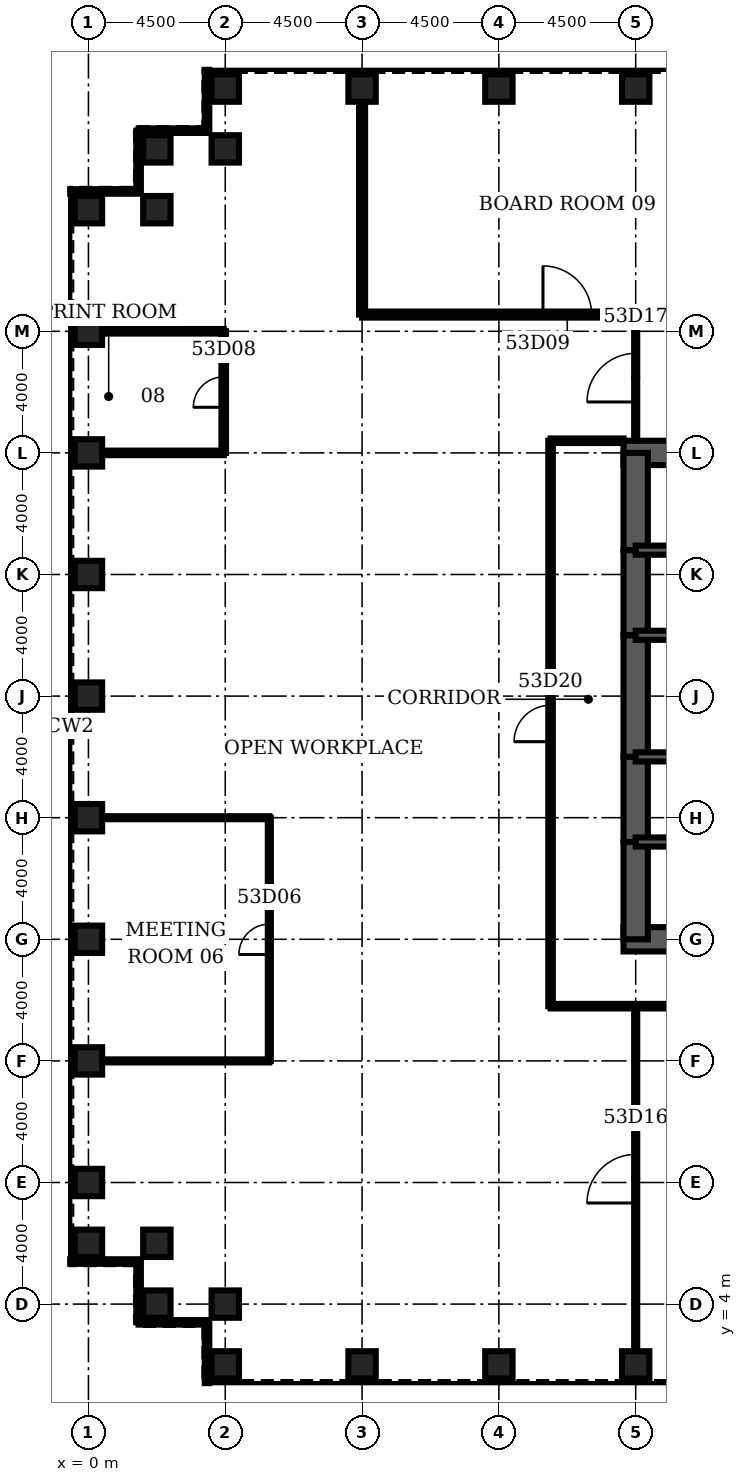
"""IFC4 building model, lengths in metres.
Left out: names, types, materials, properties, quantities, classifications, styles, units other than length and angle.
Written with IfcOpenShell. Run it as: python <this file> out.ifc"""

import sys

from ifc_helpers import new_model, si_unit, direction, frame, frame_2d, origin, origin_2d, place, context, subcontext, project, spatial, rectangle, hollow_rectangle, extrude, element, fill, save


model = new_model("IFC4")
c1 = context("Model", 3, precision=1e-05, world=origin(), true_north=direction((0.0, 1.0)))
c2 = subcontext(c1, "Body", "Model", "MODEL_VIEW")
j1 = project(units=[si_unit("LENGTHUNIT", "METRE"), si_unit("PLANEANGLEUNIT", "RADIAN")], contexts=[c1])
p1 = place(None, origin())
s1 = spatial("IfcSite", under=j1, at=p1, CompositionType="ELEMENT")
p2 = place(p1, origin())
s2 = spatial("IfcBuilding", under=s1, at=p2, CompositionType="ELEMENT")
p3 = place(p2, frame((0.0, 0.0, 236.2)))
s3 = spatial("IfcBuildingStorey", under=s2, at=p3, CompositionType="ELEMENT", Elevation=236.2)
for number, where, z_axis, x_axis in (
    (1, (4.5, 2.0, 0.0), (0.0, 0.0, 1.0), (0.0, 1.0, 0.0)),
    (2, (9.0, 2.0, 0.0), (0.0, 0.0, 1.0), (0.0, 1.0, 0.0)),
    (3, (13.5, 2.0, 0.0), (0.0, 0.0, 1.0), (0.0, 1.0, 0.0)),
    (4, (18.0, 2.0, 0.0), (0.0, 0.0, 1.0), (0.0, 1.0, 0.0)),
    (5, (18.0, 44.0, 0.0), (0.0, 0.0, 1.0), (0.0, 1.0, 0.0)),
    (6, (13.5, 44.0, 0.0), (0.0, 0.0, 1.0), (0.0, 1.0, 0.0)),
    (7, (9.0, 44.0, 0.0), (0.0, 0.0, 1.0), (0.0, 1.0, 0.0)),
    (8, (4.5, 44.0, 0.0), (0.0, 0.0, 1.0), (0.0, 1.0, 0.0)),
    (9, (4.5, 42.0, 0.0), (0.0, 0.0, 1.0), (0.0, 1.0, 0.0)),
    (10, (2.25, 42.0, 0.0), (0.0, 0.0, 1.0), (1.0, 0.0, 0.0)),
    (11, (2.25, 40.0, 0.0), (0.0, 0.0, 1.0), (1.0, 0.0, 0.0)),
    (12, (0.0, 40.0, 0.0), (0.0, 0.0, 1.0), (1.0, 0.0, 0.0)),
    (13, (0.0, 36.0, 0.0), (0.0, 0.0, 1.0), (1.0, 0.0, 0.0)),
    (14, (0.0, 32.0, 0.0), (0.0, 0.0, 1.0), (1.0, 0.0, 0.0)),
    (15, (0.0, 28.0, 0.0), (0.0, 0.0, 1.0), (1.0, 0.0, 0.0)),
    (16, (0.0, 24.0, 0.0), (0.0, 0.0, 1.0), (1.0, 0.0, 0.0)),
    (17, (0.0, 20.0, 0.0), (0.0, 0.0, 1.0), (1.0, 0.0, 0.0)),
    (18, (0.0, 16.0, 0.0), (0.0, 0.0, 1.0), (1.0, 0.0, 0.0)),
    (19, (0.0, 12.0, 0.0), (0.0, 0.0, 1.0), (1.0, 0.0, 0.0)),
    (20, (0.0, 8.0, 0.0), (0.0, 0.0, 1.0), (1.0, 0.0, 0.0)),
    (21, (0.0, 6.0, 0.0), (0.0, 0.0, 1.0), (1.0, 0.0, 0.0)),
    (22, (2.25, 6.0, 0.0), (0.0, 0.0, 1.0), (1.0, 0.0, 0.0)),
    (23, (2.25, 4.0, 0.0), (0.0, 0.0, 1.0), (1.0, 0.0, 0.0)),
    (24, (4.5, 4.0, 0.0), (0.0, 0.0, 1.0), (0.0, 1.0, 0.0)),
):
    element("IfcColumn", number, at=place(p3, frame(where, z_axis=z_axis, x_axis=x_axis)), inside=s3, PredefinedType="COLUMN", context=c2, shape_type="SweptSolid", body=[
        extrude(hollow_rectangle(XDim=0.9, YDim=0.9, WallThickness=0.08, at=origin_2d()), origin(), (0.0, 0.0, 1.0), 4.2),
    ])
for number, where, z_axis, x_axis in (
    (25, (17.6, 16.0, 0.0), (0.0, 0.0, 1.0), (1.0, 0.0, 0.0)),
    (26, (27.0, 32.0, 0.0), (0.0, 0.0, 1.0), (-1.0, 0.0, 0.0)),
):
    element("IfcWall", number, at=place(p3, frame(where, z_axis=z_axis, x_axis=x_axis)), inside=s3, PredefinedType="SHEAR", context=c2, shape_type="SweptSolid", body=[
        extrude(rectangle(XDim=9.4, YDim=0.8, at=frame_2d((4.7, 0.0))), origin(), (0.0, 0.0, 1.0), 4.2),
    ])
p4 = place(p3, frame((18.0, 32.0, 0.0), z_axis=(0.0, 0.0, 1.0), x_axis=(0.0, -1.0, 0.0)))
e27 = element("IfcWall", 27, at=p4, inside=s3, PredefinedType="SHEAR", context=c2, shape_type="SweptSolid", body=[
    extrude(rectangle(XDim=3.2, YDim=0.8, at=frame_2d((1.6, 0.0))), origin(), (0.0, 0.0, 1.0), 4.2),
])
p5 = place(p3, frame((18.0, 28.8, 0.0), z_axis=(0.0, 0.0, 1.0), x_axis=(0.0, -1.0, 0.0)))
e28 = element("IfcWall", 28, at=p5, inside=s3, PredefinedType="SHEAR", context=c2, shape_type="SweptSolid", body=[
    extrude(rectangle(XDim=2.8, YDim=0.8, at=frame_2d((1.4, 0.0))), origin(), (0.0, 0.0, 1.0), 4.2),
])
p6 = place(p5, frame((0.4, 0.0, 0.0)))
e29 = element("IfcOpeningElement", 29, at=p6, cuts=e28, PredefinedType="OPENING", context=c2, shape_type="SweptSolid", body=[
    extrude(rectangle(XDim=1.8, YDim=2.1, at=frame_2d((0.9, 1.05))), frame((0.0, 0.41, 0.0), z_axis=(0.0, -1.0, 0.0), x_axis=(1.0, 0.0, 0.0)), (0.0, 0.0, 1.0), 0.82),
])
p7 = place(p3, frame((18.0, 26.0, 0.0), z_axis=(0.0, 0.0, 1.0), x_axis=(0.0, -1.0, 0.0)))
e30 = element("IfcWall", 30, at=p7, inside=s3, PredefinedType="SHEAR", context=c2, shape_type="SweptSolid", body=[
    extrude(rectangle(XDim=4.0, YDim=0.8, at=frame_2d((2.0, 0.0))), origin(), (0.0, 0.0, 1.0), 4.2),
])
p8 = place(p3, frame((18.0, 22.0, 0.0), z_axis=(0.0, 0.0, 1.0), x_axis=(0.0, -1.0, 0.0)))
e31 = element("IfcWall", 31, at=p8, inside=s3, PredefinedType="SHEAR", context=c2, shape_type="SweptSolid", body=[
    extrude(rectangle(XDim=2.8, YDim=0.8, at=frame_2d((1.4, 0.0))), origin(), (0.0, 0.0, 1.0), 4.2),
])
p9 = place(p8, frame((0.6, 0.0, 0.0)))
e32 = element("IfcOpeningElement", 32, at=p9, cuts=e31, PredefinedType="OPENING", context=c2, shape_type="SweptSolid", body=[
    extrude(rectangle(XDim=1.8, YDim=2.1, at=frame_2d((0.9, 1.05))), frame((0.0, 0.41, 0.0), z_axis=(0.0, -1.0, 0.0), x_axis=(1.0, 0.0, 0.0)), (0.0, 0.0, 1.0), 0.82),
])
p10 = place(p3, frame((18.0, 19.2, 0.0), z_axis=(0.0, 0.0, 1.0), x_axis=(0.0, -1.0, 0.0)))
e33 = element("IfcWall", 33, at=p10, inside=s3, PredefinedType="SHEAR", context=c2, shape_type="SweptSolid", body=[
    extrude(rectangle(XDim=3.2, YDim=0.8, at=frame_2d((1.6, 0.0))), origin(), (0.0, 0.0, 1.0), 4.2),
])
p11 = place(p3, frame((18.0, 19.2, 0.0), z_axis=(0.0, 0.0, 1.0), x_axis=(1.0, 0.0, 0.0)))
e34 = element("IfcWall", 34, at=p11, inside=s3, PredefinedType="SOLIDWALL", context=c2, shape_type="SweptSolid", body=[
    extrude(rectangle(XDim=9.0, YDim=0.3, at=frame_2d((4.5, 0.0))), origin(), (0.0, 0.0, 1.0), 4.2),
])
p12 = place(p11, frame((0.65, 0.0, 0.0)))
e35 = element("IfcOpeningElement", 35, at=p12, cuts=e34, PredefinedType="OPENING", context=c2, shape_type="SweptSolid", body=[
    extrude(rectangle(XDim=1.0, YDim=2.1, at=frame_2d((0.5, 1.05))), frame((0.0, 0.16, 0.0), z_axis=(0.0, -1.0, 0.0), x_axis=(1.0, 0.0, 0.0)), (0.0, 0.0, 1.0), 0.32),
])
p13 = place(p3, frame((18.0, 28.8, 0.0), z_axis=(0.0, 0.0, 1.0), x_axis=(1.0, 0.0, 0.0)))
e36 = element("IfcWall", 36, at=p13, inside=s3, PredefinedType="SOLIDWALL", context=c2, shape_type="SweptSolid", body=[
    extrude(rectangle(XDim=9.0, YDim=0.3, at=frame_2d((4.5, 0.0))), origin(), (0.0, 0.0, 1.0), 4.2),
])
p14 = place(p13, frame((0.65, 0.0, 0.0)))
e37 = element("IfcOpeningElement", 37, at=p14, cuts=e36, PredefinedType="OPENING", context=c2, shape_type="SweptSolid", body=[
    extrude(rectangle(XDim=1.0, YDim=2.1, at=frame_2d((0.5, 1.05))), frame((0.0, 0.16, 0.0), z_axis=(0.0, -1.0, 0.0), x_axis=(1.0, 0.0, 0.0)), (0.0, 0.0, 1.0), 0.32),
])
p15 = place(p3, frame((18.0, 22.0, 0.0), z_axis=(0.0, 0.0, 1.0), x_axis=(1.0, 0.0, 0.0)))
e38 = element("IfcWall", 38, at=p15, inside=s3, PredefinedType="SOLIDWALL", context=c2, shape_type="SweptSolid", body=[
    extrude(rectangle(XDim=6.0, YDim=0.3, at=frame_2d((3.0, 0.0))), origin(), (0.0, 0.0, 1.0), 4.2),
])
p16 = place(p15, frame((4.4, 0.0, 0.0)))
e39 = element("IfcOpeningElement", 39, at=p16, cuts=e38, PredefinedType="OPENING", context=c2, shape_type="SweptSolid", body=[
    extrude(rectangle(XDim=1.0, YDim=2.1, at=frame_2d((0.5, 1.05))), frame((0.0, 0.16, 0.0), z_axis=(0.0, -1.0, 0.0), x_axis=(1.0, 0.0, 0.0)), (0.0, 0.0, 1.0), 0.32),
])
p17 = place(p15, frame((0.95, 0.0, 0.0)))
e40 = element("IfcOpeningElement", 40, at=p17, cuts=e38, PredefinedType="OPENING", context=c2, shape_type="SweptSolid", body=[
    extrude(rectangle(XDim=1.0, YDim=2.1, at=frame_2d((0.5, 1.05))), frame((0.0, 0.16, 0.0), z_axis=(0.0, -1.0, 0.0), x_axis=(1.0, 0.0, 0.0)), (0.0, 0.0, 1.0), 0.32),
])
p18 = place(p3, frame((18.0, 26.0, 0.0), z_axis=(0.0, 0.0, 1.0), x_axis=(1.0, 0.0, 0.0)))
e41 = element("IfcWall", 41, at=p18, inside=s3, PredefinedType="SOLIDWALL", context=c2, shape_type="SweptSolid", body=[
    extrude(rectangle(XDim=6.0, YDim=0.3, at=frame_2d((3.0, 0.0))), origin(), (0.0, 0.0, 1.0), 4.2),
])
p19 = place(p3, frame((0.45, 12.0, 0.0), z_axis=(0.0, 0.0, 1.0), x_axis=(1.0, 0.0, 0.0)))
e42 = element("IfcWall", 42, at=p19, inside=s3, PredefinedType="PARTITIONING", context=c2, shape_type="SweptSolid", body=[
    extrude(rectangle(XDim=5.5, YDim=0.1, at=frame_2d((2.75, 0.0))), origin(), (0.0, 0.0, 1.0), 3.0),
])
p20 = place(p3, frame((15.2, 13.8, 0.0), z_axis=(0.0, 0.0, 1.0), x_axis=(1.0, 0.0, 0.0)))
e43 = element("IfcWall", 43, at=p20, inside=s3, PredefinedType="PARTITIONING", context=c2, shape_type="SweptSolid", body=[
    extrude(rectangle(XDim=6.8, YDim=0.15, at=frame_2d((3.4, 0.0))), origin(), (0.0, 0.0, 1.0), 3.0),
])
p21 = place(p3, frame((0.45, 20.0, 0.0), z_axis=(0.0, 0.0, 1.0), x_axis=(1.0, 0.0, 0.0)))
e44 = element("IfcWall", 44, at=p21, inside=s3, PredefinedType="PARTITIONING", context=c2, shape_type="SweptSolid", body=[
    extrude(rectangle(XDim=5.5, YDim=0.1, at=frame_2d((2.75, 0.0))), origin(), (0.0, 0.0, 1.0), 3.0),
])
p22 = place(p3, frame((0.45, 32.0, 0.0), z_axis=(0.0, 0.0, 1.0), x_axis=(1.0, 0.0, 0.0)))
e45 = element("IfcWall", 45, at=p22, inside=s3, PredefinedType="PARTITIONING", context=c2, shape_type="SweptSolid", body=[
    extrude(rectangle(XDim=4.0, YDim=0.15, at=frame_2d((2.0, 0.0))), origin(), (0.0, 0.0, 1.0), 3.0),
])
p23 = place(p3, frame((15.2, 32.4, 0.0), z_axis=(0.0, 0.0, 1.0), x_axis=(1.0, 0.0, 0.0)))
e46 = element("IfcWall", 46, at=p23, inside=s3, PredefinedType="PARTITIONING", context=c2, shape_type="SweptSolid", body=[
    extrude(rectangle(XDim=2.4, YDim=0.15, at=frame_2d((1.2, 0.0))), origin(), (0.0, 0.0, 1.0), 3.0),
])
p24 = place(p3, frame((0.45, 36.0, 0.0), z_axis=(0.0, 0.0, 1.0), x_axis=(1.0, 0.0, 0.0)))
e47 = element("IfcWall", 47, at=p24, inside=s3, PredefinedType="PARTITIONING", context=c2, shape_type="SweptSolid", body=[
    extrude(rectangle(XDim=4.0, YDim=0.15, at=frame_2d((2.0, 0.0))), origin(), (0.0, 0.0, 1.0), 3.0),
])
p25 = place(p3, frame((9.0, 36.55, 0.0), z_axis=(0.0, 0.0, 1.0), x_axis=(1.0, 0.0, 0.0)))
e48 = element("IfcWall", 48, at=p25, inside=s3, PredefinedType="PARTITIONING", context=c2, shape_type="SweptSolid", body=[
    extrude(rectangle(XDim=13.5, YDim=0.2, at=frame_2d((6.75, 0.0))), origin(), (0.0, 0.0, 1.0), 3.0),
])
p26 = place(p25, frame((5.95, 0.0, 0.0)))
e49 = element("IfcOpeningElement", 49, at=p26, cuts=e48, PredefinedType="OPENING", context=c2, shape_type="SweptSolid", body=[
    extrude(rectangle(XDim=1.6, YDim=2.1, at=frame_2d((0.8, 1.05))), frame((0.0, 0.11, 0.0), z_axis=(0.0, -1.0, 0.0), x_axis=(1.0, 0.0, 0.0)), (0.0, 0.0, 1.0), 0.22),
])
p27 = place(p3, frame((4.45, 32.0, 0.0), z_axis=(0.0, 0.0, 1.0), x_axis=(0.0, 1.0, 0.0)))
e50 = element("IfcWall", 50, at=p27, inside=s3, PredefinedType="PARTITIONING", context=c2, shape_type="SweptSolid", body=[
    extrude(rectangle(XDim=4.0, YDim=0.15, at=frame_2d((2.0, 0.0))), origin(), (0.0, 0.0, 1.0), 3.0),
])
p28 = place(p27, frame((1.5, 0.0, 0.0)))
e51 = element("IfcOpeningElement", 51, at=p28, cuts=e50, PredefinedType="OPENING", context=c2, shape_type="SweptSolid", body=[
    extrude(rectangle(XDim=1.0, YDim=2.1, at=frame_2d((0.5, 1.05))), frame((0.0, 0.085, 0.0), z_axis=(0.0, -1.0, 0.0), x_axis=(1.0, 0.0, 0.0)), (0.0, 0.0, 1.0), 0.17),
])
p29 = place(p3, frame((5.95, 12.0, 0.0), z_axis=(0.0, 0.0, 1.0), x_axis=(0.0, 1.0, 0.0)))
e52 = element("IfcWall", 52, at=p29, inside=s3, PredefinedType="PARTITIONING", context=c2, shape_type="SweptSolid", body=[
    extrude(rectangle(XDim=8.0, YDim=0.1, at=frame_2d((4.0, 0.0))), origin(), (0.0, 0.0, 1.0), 3.0),
])
p30 = place(p29, frame((3.5, 0.0, 0.0)))
e53 = element("IfcOpeningElement", 53, at=p30, cuts=e52, PredefinedType="OPENING", context=c2, shape_type="SweptSolid", body=[
    extrude(rectangle(XDim=1.0, YDim=2.1, at=frame_2d((0.5, 1.05))), frame((0.0, 0.06, 0.0), z_axis=(0.0, -1.0, 0.0), x_axis=(1.0, 0.0, 0.0)), (0.0, 0.0, 1.0), 0.12),
])
p31 = place(p3, frame((9.0, 36.55, 0.0), z_axis=(0.0, 0.0, 1.0), x_axis=(0.0, 1.0, 0.0)))
e54 = element("IfcWall", 54, at=p31, inside=s3, PredefinedType="PARTITIONING", context=c2, shape_type="SweptSolid", body=[
    extrude(rectangle(XDim=7.0, YDim=0.2, at=frame_2d((3.5, 0.0))), origin(), (0.0, 0.0, 1.0), 3.0),
])
p32 = place(p3, frame((15.2, 13.8, 0.0), z_axis=(0.0, 0.0, 1.0), x_axis=(0.0, 1.0, 0.0)))
e55 = element("IfcWall", 55, at=p32, inside=s3, PredefinedType="PARTITIONING", context=c2, shape_type="SweptSolid", body=[
    extrude(rectangle(XDim=18.6, YDim=0.15, at=frame_2d((9.3, 0.0))), origin(), (0.0, 0.0, 1.0), 3.0),
])
p33 = place(p32, frame((8.7, 0.0, 0.0)))
e56 = element("IfcOpeningElement", 56, at=p33, cuts=e55, PredefinedType="OPENING", context=c2, shape_type="SweptSolid", body=[
    extrude(rectangle(XDim=1.2, YDim=2.1, at=frame_2d((0.6, 1.05))), frame((0.0, 0.085, 0.0), z_axis=(0.0, -1.0, 0.0), x_axis=(1.0, 0.0, 0.0)), (0.0, 0.0, 1.0), 0.17),
])
p34 = place(p3, frame((18.0, 2.45, 0.0), z_axis=(0.0, 0.0, 1.0), x_axis=(0.0, 1.0, 0.0)))
e57 = element("IfcWall", 57, at=p34, inside=s3, PredefinedType="PARTITIONING", context=c2, shape_type="SweptSolid", body=[
    extrude(rectangle(XDim=11.35, YDim=0.1, at=frame_2d((5.675, 0.0))), origin(), (0.0, 0.0, 1.0), 3.0),
])
p35 = place(p34, frame((4.875, 0.0, 0.0)))
e58 = element("IfcOpeningElement", 58, at=p35, cuts=e57, PredefinedType="OPENING", context=c2, shape_type="SweptSolid", body=[
    extrude(rectangle(XDim=1.6, YDim=2.1, at=frame_2d((0.8, 1.05))), frame((0.0, 0.06, 0.0), z_axis=(0.0, -1.0, 0.0), x_axis=(1.0, 0.0, 0.0)), (0.0, 0.0, 1.0), 0.12),
])
p36 = place(p3, frame((18.0, 32.4, 0.0), z_axis=(0.0, 0.0, 1.0), x_axis=(0.0, 1.0, 0.0)))
e59 = element("IfcWall", 59, at=p36, inside=s3, PredefinedType="PARTITIONING", context=c2, shape_type="SweptSolid", body=[
    extrude(rectangle(XDim=4.15, YDim=0.1, at=frame_2d((2.075, 0.0))), origin(), (0.0, 0.0, 1.0), 3.0),
])
p37 = place(p36, frame((1.275, 0.0, 0.0)))
e60 = element("IfcOpeningElement", 60, at=p37, cuts=e59, PredefinedType="OPENING", context=c2, shape_type="SweptSolid", body=[
    extrude(rectangle(XDim=1.6, YDim=2.1, at=frame_2d((0.8, 1.05))), frame((0.0, 0.06, 0.0), z_axis=(0.0, -1.0, 0.0), x_axis=(1.0, 0.0, 0.0)), (0.0, 0.0, 1.0), 0.12),
])
p38 = place(p3, frame((3.9, 44.6, 0.0), z_axis=(0.0, 0.0, 1.0), x_axis=(0.0, -1.0, 0.0)))
e61 = element("IfcWall", 61, at=p38, inside=s3, PredefinedType="ELEMENTEDWALL", context=c2, shape_type="SweptSolid", body=[
    extrude(rectangle(XDim=2.0, YDim=0.15, at=frame_2d((1.0, 0.0))), origin(), (0.0, 0.0, 1.0), 4.04),
])
p39 = place(p3, frame((3.9, 42.6, 0.0), z_axis=(0.0, 0.0, 1.0), x_axis=(-1.0, 0.0, 0.0)))
e62 = element("IfcWall", 62, at=p39, inside=s3, PredefinedType="ELEMENTEDWALL", context=c2, shape_type="SweptSolid", body=[
    extrude(rectangle(XDim=2.25, YDim=0.15, at=frame_2d((1.125, 0.0))), origin(), (0.0, 0.0, 1.0), 4.04),
])
p40 = place(p3, frame((1.65, 42.6, 0.0), z_axis=(0.0, 0.0, 1.0), x_axis=(0.0, -1.0, 0.0)))
e63 = element("IfcWall", 63, at=p40, inside=s3, PredefinedType="ELEMENTEDWALL", context=c2, shape_type="SweptSolid", body=[
    extrude(rectangle(XDim=2.0, YDim=0.15, at=frame_2d((1.0, 0.0))), origin(), (0.0, 0.0, 1.0), 4.04),
])
for number, where, z_axis, x_axis in (
    (64, (1.65, 40.6, 0.0), (0.0, 0.0, 1.0), (-1.0, 0.0, 0.0)),
    (65, (-0.6, 5.4, 0.0), (0.0, 0.0, 1.0), (1.0, 0.0, 0.0)),
):
    element("IfcWall", number, at=place(p3, frame(where, z_axis=z_axis, x_axis=x_axis)), inside=s3, PredefinedType="ELEMENTEDWALL", context=c2, shape_type="SweptSolid", body=[
        extrude(rectangle(XDim=2.25, YDim=0.15, at=frame_2d((1.125, 0.0))), origin(), (0.0, 0.0, 1.0), 4.04),
    ])
p41 = place(p3, frame((1.65, 5.4, 0.0), z_axis=(0.0, 0.0, 1.0), x_axis=(0.0, -1.0, 0.0)))
e66 = element("IfcWall", 66, at=p41, inside=s3, PredefinedType="ELEMENTEDWALL", context=c2, shape_type="SweptSolid", body=[
    extrude(rectangle(XDim=2.0, YDim=0.15, at=frame_2d((1.0, 0.0))), origin(), (0.0, 0.0, 1.0), 4.04),
])
p42 = place(p3, frame((1.65, 3.4, 0.0), z_axis=(0.0, 0.0, 1.0), x_axis=(1.0, 0.0, 0.0)))
e67 = element("IfcWall", 67, at=p42, inside=s3, PredefinedType="ELEMENTEDWALL", context=c2, shape_type="SweptSolid", body=[
    extrude(rectangle(XDim=2.25, YDim=0.15, at=frame_2d((1.125, 0.0))), origin(), (0.0, 0.0, 1.0), 4.04),
])
p43 = place(p3, frame((3.9, 3.4, 0.0), z_axis=(0.0, 0.0, 1.0), x_axis=(0.0, -1.0, 0.0)))
e68 = element("IfcWall", 68, at=p43, inside=s3, PredefinedType="ELEMENTEDWALL", context=c2, shape_type="SweptSolid", body=[
    extrude(rectangle(XDim=2.0, YDim=0.15, at=frame_2d((1.0, 0.0))), origin(), (0.0, 0.0, 1.0), 4.04),
])
p44 = place(p30, origin())
e69 = element("IfcDoor", 69, at=p44, inside=s3, OperationType="SINGLE_SWING_LEFT", PredefinedType="DOOR", context=c2, shape_type="SweptSolid", body=[
    extrude(rectangle(XDim=1.0, YDim=2.1, at=frame_2d((0.5, 1.05))), frame((0.0, 0.025, 0.0), z_axis=(0.0, -1.0, 0.0), x_axis=(1.0, 0.0, 0.0)), (0.0, 0.0, 1.0), 0.05),
])
fill(e53, e69)
p45 = place(p28, origin())
e70 = element("IfcDoor", 70, at=p45, inside=s3, OperationType="SINGLE_SWING_LEFT", PredefinedType="DOOR", context=c2, shape_type="SweptSolid", body=[
    extrude(rectangle(XDim=1.0, YDim=2.1, at=frame_2d((0.5, 1.05))), frame((0.0, 0.025, 0.0), z_axis=(0.0, -1.0, 0.0), x_axis=(1.0, 0.0, 0.0)), (0.0, 0.0, 1.0), 0.05),
])
fill(e51, e70)
p46 = place(p26, origin())
e71 = element("IfcDoor", 71, at=p46, inside=s3, OperationType="SINGLE_SWING_LEFT", PredefinedType="DOOR", context=c2, shape_type="SweptSolid", body=[
    extrude(rectangle(XDim=1.6, YDim=2.1, at=frame_2d((0.8, 1.05))), frame((0.0, 0.025, 0.0), z_axis=(0.0, -1.0, 0.0), x_axis=(1.0, 0.0, 0.0)), (0.0, 0.0, 1.0), 0.05),
])
fill(e49, e71)
p47 = place(p35, origin())
e72 = element("IfcDoor", 72, at=p47, inside=s3, OperationType="SINGLE_SWING_LEFT", PredefinedType="DOOR", context=c2, shape_type="SweptSolid", body=[
    extrude(rectangle(XDim=1.6, YDim=2.1, at=frame_2d((0.8, 1.05))), frame((0.0, 0.025, 0.0), z_axis=(0.0, -1.0, 0.0), x_axis=(1.0, 0.0, 0.0)), (0.0, 0.0, 1.0), 0.05),
])
fill(e58, e72)
p48 = place(p37, origin())
e73 = element("IfcDoor", 73, at=p48, inside=s3, OperationType="SINGLE_SWING_LEFT", PredefinedType="DOOR", context=c2, shape_type="SweptSolid", body=[
    extrude(rectangle(XDim=1.6, YDim=2.1, at=frame_2d((0.8, 1.05))), frame((0.0, 0.025, 0.0), z_axis=(0.0, -1.0, 0.0), x_axis=(1.0, 0.0, 0.0)), (0.0, 0.0, 1.0), 0.05),
])
fill(e60, e73)
p49 = place(p33, origin())
e74 = element("IfcDoor", 74, at=p49, inside=s3, OperationType="SINGLE_SWING_LEFT", PredefinedType="DOOR", context=c2, shape_type="SweptSolid", body=[
    extrude(rectangle(XDim=1.2, YDim=2.1, at=frame_2d((0.6, 1.05))), frame((0.0, 0.025, 0.0), z_axis=(0.0, -1.0, 0.0), x_axis=(1.0, 0.0, 0.0)), (0.0, 0.0, 1.0), 0.05),
])
fill(e56, e74)
p50 = place(p12, origin())
e75 = element("IfcDoor", 75, at=p50, inside=s3, OperationType="SINGLE_SWING_LEFT", PredefinedType="DOOR", context=c2, shape_type="SweptSolid", body=[
    extrude(rectangle(XDim=1.0, YDim=2.1, at=frame_2d((0.5, 1.05))), frame((0.0, 0.025, 0.0), z_axis=(0.0, -1.0, 0.0), x_axis=(1.0, 0.0, 0.0)), (0.0, 0.0, 1.0), 0.05),
])
fill(e35, e75)
p51 = place(p14, origin())
e76 = element("IfcDoor", 76, at=p51, inside=s3, OperationType="SINGLE_SWING_LEFT", PredefinedType="DOOR", context=c2, shape_type="SweptSolid", body=[
    extrude(rectangle(XDim=1.0, YDim=2.1, at=frame_2d((0.5, 1.05))), frame((0.0, 0.025, 0.0), z_axis=(0.0, -1.0, 0.0), x_axis=(1.0, 0.0, 0.0)), (0.0, 0.0, 1.0), 0.05),
])
fill(e37, e76)
p52 = place(p9, origin())
e77 = element("IfcDoor", 77, at=p52, inside=s3, OperationType="SINGLE_SWING_LEFT", PredefinedType="DOOR", context=c2, shape_type="SweptSolid", body=[
    extrude(rectangle(XDim=1.8, YDim=2.1, at=frame_2d((0.9, 1.05))), frame((0.0, 0.4, 0.0), z_axis=(0.0, -1.0, 0.0), x_axis=(1.0, 0.0, 0.0)), (0.0, 0.0, 1.0), 0.8),
])
fill(e32, e77)
p53 = place(p6, origin())
e78 = element("IfcDoor", 78, at=p53, inside=s3, OperationType="SINGLE_SWING_LEFT", PredefinedType="DOOR", context=c2, shape_type="SweptSolid", body=[
    extrude(rectangle(XDim=1.8, YDim=2.1, at=frame_2d((0.9, 1.05))), frame((0.0, 0.4, 0.0), z_axis=(0.0, -1.0, 0.0), x_axis=(1.0, 0.0, 0.0)), (0.0, 0.0, 1.0), 0.8),
])
fill(e29, e78)
p54 = place(p17, origin())
e79 = element("IfcDoor", 79, at=p54, inside=s3, OperationType="SINGLE_SWING_LEFT", PredefinedType="DOOR", context=c2, shape_type="SweptSolid", body=[
    extrude(rectangle(XDim=1.0, YDim=2.1, at=frame_2d((0.5, 1.05))), frame((0.0, 0.025, 0.0), z_axis=(0.0, -1.0, 0.0), x_axis=(1.0, 0.0, 0.0)), (0.0, 0.0, 1.0), 0.05),
])
fill(e40, e79)
save(model, sys.argv[1])
